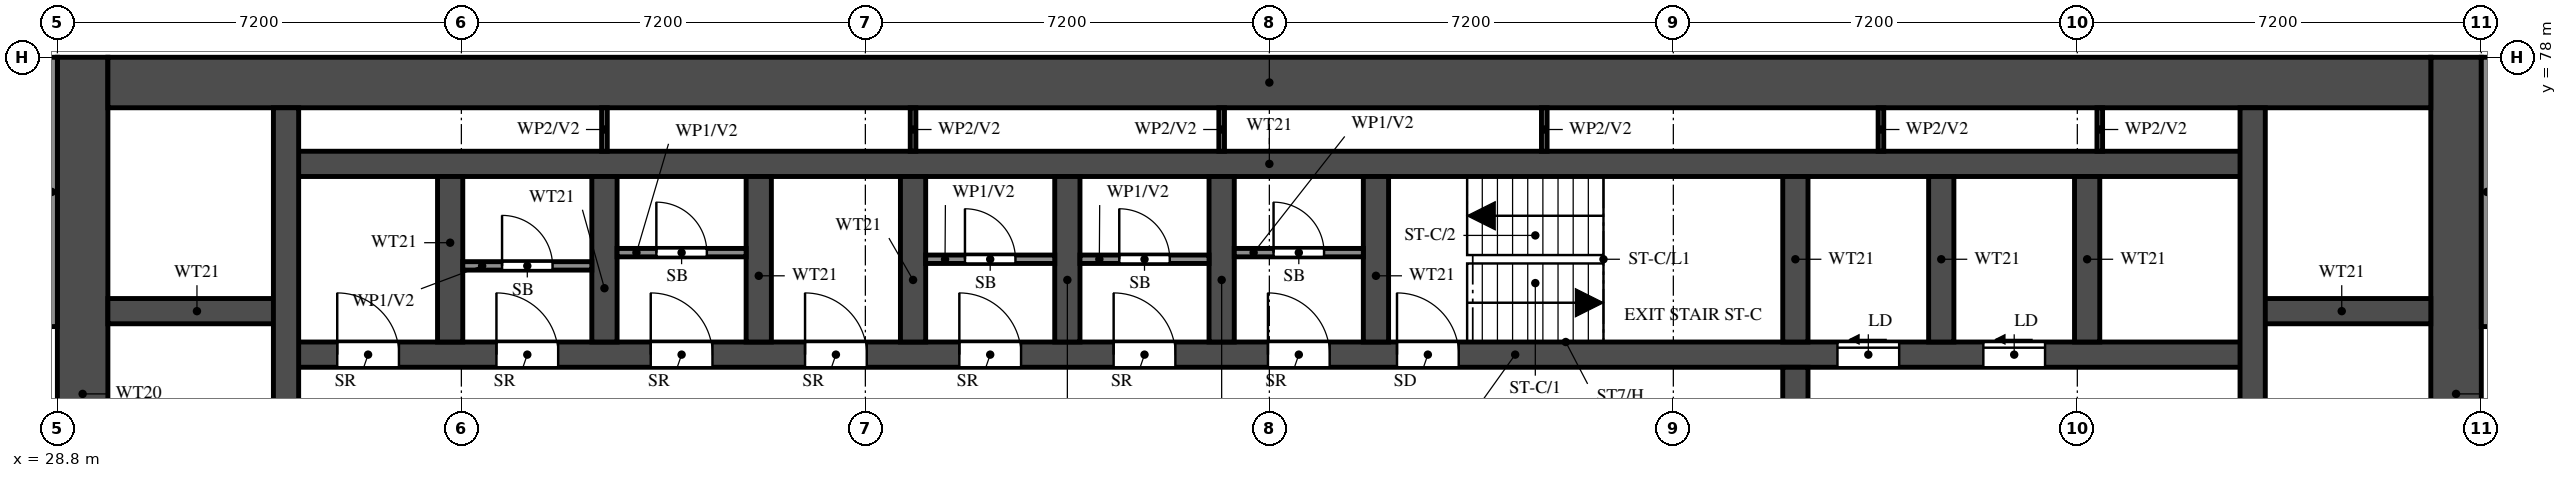
"""IFC4 building model, lengths in metres.
Left out: names, types, materials, properties, quantities, classifications, styles, units other than length and angle.
Written with IfcOpenShell. Run it as: python <this file> out.ifc"""

import sys

from ifc_helpers import new_model, si_unit, direction, frame, frame_2d, origin, place, context, subcontext, project, spatial, rectangle, extrude, element, fill, save


model = new_model("IFC4")
c1 = context("Model", 3, precision=1e-05, world=origin(), true_north=direction((0.0, 1.0)))
c2 = subcontext(c1, "Body", "Model", "MODEL_VIEW")
j1 = project(units=[si_unit("LENGTHUNIT", "METRE"), si_unit("PLANEANGLEUNIT", "RADIAN")], contexts=[c1])
p1 = place(None, origin())
s1 = spatial("IfcSite", under=j1, at=p1, CompositionType="ELEMENT")
p2 = place(p1, origin())
s2 = spatial("IfcBuilding", under=s1, at=p2, CompositionType="ELEMENT")
p3 = place(p2, frame((0.0, 0.0, 44.5)))
s3 = spatial("IfcBuildingStorey", under=s2, at=p3, CompositionType="ELEMENT", Elevation=44.5)
for number, where, z_axis, x_axis in (
    (1, (29.25, 66.0, 0.0), (0.0, 0.0, 1.0), (0.0, 1.0, 0.0)),
    (2, (71.55, 66.0, 0.0), (0.0, 0.0, 1.0), (0.0, 1.0, 0.0)),
):
    element("IfcWall", number, at=place(p3, frame(where, z_axis=z_axis, x_axis=x_axis)), inside=s3, PredefinedType="SHEAR", context=c2, shape_type="SweptSolid", body=[
        extrude(rectangle(XDim=12.0, YDim=0.9, at=frame_2d((6.0, 0.0))), origin(), (0.0, 0.0, 1.0), 3.18),
    ])
p4 = place(p3, frame((29.7, 77.55, 0.0), z_axis=(0.0, 0.0, 1.0), x_axis=(1.0, 0.0, 0.0)))
e3 = element("IfcWall", 3, at=p4, inside=s3, PredefinedType="SHEAR", context=c2, shape_type="SweptSolid", body=[
    extrude(rectangle(XDim=41.4, YDim=0.9, at=frame_2d((20.7, 0.0))), origin(), (0.0, 0.0, 1.0), 3.18),
])
p5 = place(p3, frame((32.875, 72.7, 0.0), z_axis=(0.0, 0.0, 1.0), x_axis=(1.0, 0.0, 0.0)))
e4 = element("IfcWall", 4, at=p5, inside=s3, PredefinedType="SHEAR", context=c2, shape_type="SweptSolid", body=[
    extrude(rectangle(XDim=35.05, YDim=0.45, at=frame_2d((17.525, 0.0))), origin(), (0.0, 0.0, 1.0), 3.18),
])
p6 = place(p5, frame((19.8, 0.0, 0.0)))
e5 = element("IfcOpeningElement", 5, at=p6, cuts=e4, PredefinedType="OPENING", context=c2, shape_type="SweptSolid", body=[
    extrude(rectangle(XDim=1.1, YDim=2.1, at=frame_2d((0.55, 1.05))), frame((0.0, 0.235, 0.0), z_axis=(0.0, -1.0, 0.0), x_axis=(1.0, 0.0, 0.0)), (0.0, 0.0, 1.0), 0.47),
])
p7 = place(p5, frame((27.65, 0.0, 0.0)))
e6 = element("IfcOpeningElement", 6, at=p7, cuts=e4, PredefinedType="OPENING", context=c2, shape_type="SweptSolid", body=[
    extrude(rectangle(XDim=1.1, YDim=2.1, at=frame_2d((0.55, 1.05))), frame((0.0, 0.235, 0.0), z_axis=(0.0, -1.0, 0.0), x_axis=(1.0, 0.0, 0.0)), (0.0, 0.0, 1.0), 0.47),
])
p8 = place(p5, frame((30.25, 0.0, 0.0)))
e7 = element("IfcOpeningElement", 7, at=p8, cuts=e4, PredefinedType="OPENING", context=c2, shape_type="SweptSolid", body=[
    extrude(rectangle(XDim=1.1, YDim=2.1, at=frame_2d((0.55, 1.05))), frame((0.0, 0.235, 0.0), z_axis=(0.0, -1.0, 0.0), x_axis=(1.0, 0.0, 0.0)), (0.0, 0.0, 1.0), 0.47),
])
p9 = place(p5, frame((3.75, 0.0, 0.0)))
e8 = element("IfcOpeningElement", 8, at=p9, cuts=e4, PredefinedType="OPENING", context=c2, shape_type="SweptSolid", body=[
    extrude(rectangle(XDim=1.1, YDim=2.1, at=frame_2d((0.55, 1.05))), frame((0.0, 0.235, 0.0), z_axis=(0.0, -1.0, 0.0), x_axis=(1.0, 0.0, 0.0)), (0.0, 0.0, 1.0), 0.47),
])
p10 = place(p5, frame((6.5, 0.0, 0.0)))
e9 = element("IfcOpeningElement", 9, at=p10, cuts=e4, PredefinedType="OPENING", context=c2, shape_type="SweptSolid", body=[
    extrude(rectangle(XDim=1.1, YDim=2.1, at=frame_2d((0.55, 1.05))), frame((0.0, 0.235, 0.0), z_axis=(0.0, -1.0, 0.0), x_axis=(1.0, 0.0, 0.0)), (0.0, 0.0, 1.0), 0.47),
])
p11 = place(p5, frame((9.25, 0.0, 0.0)))
e10 = element("IfcOpeningElement", 10, at=p11, cuts=e4, PredefinedType="OPENING", context=c2, shape_type="SweptSolid", body=[
    extrude(rectangle(XDim=1.1, YDim=2.1, at=frame_2d((0.55, 1.05))), frame((0.0, 0.235, 0.0), z_axis=(0.0, -1.0, 0.0), x_axis=(1.0, 0.0, 0.0)), (0.0, 0.0, 1.0), 0.47),
])
p12 = place(p5, frame((12.0, 0.0, 0.0)))
e11 = element("IfcOpeningElement", 11, at=p12, cuts=e4, PredefinedType="OPENING", context=c2, shape_type="SweptSolid", body=[
    extrude(rectangle(XDim=1.1, YDim=2.1, at=frame_2d((0.55, 1.05))), frame((0.0, 0.235, 0.0), z_axis=(0.0, -1.0, 0.0), x_axis=(1.0, 0.0, 0.0)), (0.0, 0.0, 1.0), 0.47),
])
p13 = place(p5, frame((14.75, 0.0, 0.0)))
e12 = element("IfcOpeningElement", 12, at=p13, cuts=e4, PredefinedType="OPENING", context=c2, shape_type="SweptSolid", body=[
    extrude(rectangle(XDim=1.1, YDim=2.1, at=frame_2d((0.55, 1.05))), frame((0.0, 0.235, 0.0), z_axis=(0.0, -1.0, 0.0), x_axis=(1.0, 0.0, 0.0)), (0.0, 0.0, 1.0), 0.47),
])
p14 = place(p5, frame((17.5, 0.0, 0.0)))
e13 = element("IfcOpeningElement", 13, at=p14, cuts=e4, PredefinedType="OPENING", context=c2, shape_type="SweptSolid", body=[
    extrude(rectangle(XDim=1.1, YDim=2.1, at=frame_2d((0.55, 1.05))), frame((0.0, 0.235, 0.0), z_axis=(0.0, -1.0, 0.0), x_axis=(1.0, 0.0, 0.0)), (0.0, 0.0, 1.0), 0.47),
])
p15 = place(p5, frame((0.913, 0.0, 0.0)))
e14 = element("IfcOpeningElement", 14, at=p15, cuts=e4, PredefinedType="OPENING", context=c2, shape_type="SweptSolid", body=[
    extrude(rectangle(XDim=1.1, YDim=2.1, at=frame_2d((0.55, 1.05))), frame((0.0, 0.235, 0.0), z_axis=(0.0, -1.0, 0.0), x_axis=(1.0, 0.0, 0.0)), (0.0, 0.0, 1.0), 0.47),
])
p16 = place(p3, frame((32.875, 76.1, 0.0), z_axis=(0.0, 0.0, 1.0), x_axis=(1.0, 0.0, 0.0)))
e15 = element("IfcWall", 15, at=p16, inside=s3, PredefinedType="SHEAR", context=c2, shape_type="SweptSolid", body=[
    extrude(rectangle(XDim=35.05, YDim=0.45, at=frame_2d((17.525, 0.0))), origin(), (0.0, 0.0, 1.0), 3.18),
])
for number, where, z_axis, x_axis in (
    (16, (29.7, 73.475, 0.0), (0.0, 0.0, 1.0), (1.0, 0.0, 0.0)),
    (17, (67.925, 73.475, 0.0), (0.0, 0.0, 1.0), (1.0, 0.0, 0.0)),
):
    element("IfcWall", number, at=place(p3, frame(where, z_axis=z_axis, x_axis=x_axis)), inside=s3, PredefinedType="SHEAR", context=c2, shape_type="SweptSolid", body=[
        extrude(rectangle(XDim=3.175, YDim=0.45, at=frame_2d((1.587, 0.0))), origin(), (0.0, 0.0, 1.0), 3.18),
    ])
p17 = place(p3, frame((32.875, 66.45, 0.0), z_axis=(0.0, 0.0, 1.0), x_axis=(0.0, 1.0, 0.0)))
e18 = element("IfcWall", 18, at=p17, inside=s3, PredefinedType="SHEAR", context=c2, shape_type="SweptSolid", body=[
    extrude(rectangle(XDim=10.65, YDim=0.45, at=frame_2d((5.325, 0.0))), origin(), (0.0, 0.0, 1.0), 3.18),
])
p18 = place(p3, frame((67.925, 66.45, 0.0), z_axis=(0.0, 0.0, 1.0), x_axis=(0.0, 1.0, 0.0)))
e19 = element("IfcWall", 19, at=p18, inside=s3, PredefinedType="SHEAR", context=c2, shape_type="SweptSolid", body=[
    extrude(rectangle(XDim=10.65, YDim=0.45, at=frame_2d((5.325, 0.0))), origin(), (0.0, 0.0, 1.0), 3.18),
])
p19 = place(p18, frame((0.15, 0.0, 0.0)))
e20 = element("IfcOpeningElement", 20, at=p19, cuts=e19, PredefinedType="OPENING", context=c2, shape_type="SweptSolid", body=[
    extrude(rectangle(XDim=1.1, YDim=2.1, at=frame_2d((0.55, 1.05))), frame((0.0, 0.235, 0.0), z_axis=(0.0, -1.0, 0.0), x_axis=(1.0, 0.0, 0.0)), (0.0, 0.0, 1.0), 0.47),
])
p20 = place(p3, frame((59.775, 66.45, 0.0), z_axis=(0.0, 0.0, 1.0), x_axis=(0.0, 1.0, 0.0)))
e21 = element("IfcWall", 21, at=p20, inside=s3, PredefinedType="SHEAR", context=c2, shape_type="SweptSolid", body=[
    extrude(rectangle(XDim=6.025, YDim=0.45, at=frame_2d((3.013, 0.0))), origin(), (0.0, 0.0, 1.0), 3.18),
])
p21 = place(p20, frame((3.85, 0.0, 0.0)))
e22 = element("IfcOpeningElement", 22, at=p21, cuts=e21, PredefinedType="OPENING", context=c2, shape_type="SweptSolid", body=[
    extrude(rectangle(XDim=1.2, YDim=2.1, at=frame_2d((0.6, 1.05))), frame((0.0, 0.235, 0.0), z_axis=(0.0, -1.0, 0.0), x_axis=(1.0, 0.0, 0.0)), (0.0, 0.0, 1.0), 0.47),
])
for number, where, z_axis, x_axis in (
    (23, (59.775, 72.925, 0.0), (0.0, 0.0, 1.0), (0.0, 1.0, 0.0)),
    (24, (35.8, 72.925, 0.0), (0.0, 0.0, 1.0), (0.0, 1.0, 0.0)),
    (25, (38.55, 72.925, 0.0), (0.0, 0.0, 1.0), (0.0, 1.0, 0.0)),
    (26, (41.3, 72.925, 0.0), (0.0, 0.0, 1.0), (0.0, 1.0, 0.0)),
    (27, (44.05, 72.925, 0.0), (0.0, 0.0, 1.0), (0.0, 1.0, 0.0)),
    (28, (46.8, 72.925, 0.0), (0.0, 0.0, 1.0), (0.0, 1.0, 0.0)),
    (29, (49.55, 72.925, 0.0), (0.0, 0.0, 1.0), (0.0, 1.0, 0.0)),
    (30, (52.3, 72.925, 0.0), (0.0, 0.0, 1.0), (0.0, 1.0, 0.0)),
    (31, (62.375, 72.925, 0.0), (0.0, 0.0, 1.0), (0.0, 1.0, 0.0)),
    (32, (64.975, 72.925, 0.0), (0.0, 0.0, 1.0), (0.0, 1.0, 0.0)),
):
    element("IfcWall", number, at=place(p3, frame(where, z_axis=z_axis, x_axis=x_axis)), inside=s3, PredefinedType="SHEAR", context=c2, shape_type="SweptSolid", body=[
        extrude(rectangle(XDim=2.95, YDim=0.45, at=frame_2d((1.475, 0.0))), origin(), (0.0, 0.0, 1.0), 3.18),
    ])
p22 = place(p3, frame((36.025, 74.282, 0.0), z_axis=(0.0, 0.0, 1.0), x_axis=(1.0, 0.0, 0.0)))
e33 = element("IfcWall", 33, at=p22, inside=s3, PredefinedType="PARTITIONING", context=c2, shape_type="SweptSolid", body=[
    extrude(rectangle(XDim=2.3, YDim=0.15, at=frame_2d((1.15, 0.0))), origin(), (0.0, 0.0, 1.0), 3.18),
])
p23 = place(p22, frame((0.7, 0.0, 0.0)))
e34 = element("IfcOpeningElement", 34, at=p23, cuts=e33, PredefinedType="OPENING", context=c2, shape_type="SweptSolid", body=[
    extrude(rectangle(XDim=0.9, YDim=2.1, at=frame_2d((0.45, 1.05))), frame((0.0, 0.085, 0.0), z_axis=(0.0, -1.0, 0.0), x_axis=(1.0, 0.0, 0.0)), (0.0, 0.0, 1.0), 0.17),
])
p24 = place(p3, frame((38.775, 74.518, 0.0), z_axis=(0.0, 0.0, 1.0), x_axis=(1.0, 0.0, 0.0)))
e35 = element("IfcWall", 35, at=p24, inside=s3, PredefinedType="PARTITIONING", context=c2, shape_type="SweptSolid", body=[
    extrude(rectangle(XDim=2.3, YDim=0.15, at=frame_2d((1.15, 0.0))), origin(), (0.0, 0.0, 1.0), 3.18),
])
p25 = place(p24, frame((0.7, 0.0, 0.0)))
e36 = element("IfcOpeningElement", 36, at=p25, cuts=e35, PredefinedType="OPENING", context=c2, shape_type="SweptSolid", body=[
    extrude(rectangle(XDim=0.9, YDim=2.1, at=frame_2d((0.45, 1.05))), frame((0.0, 0.085, 0.0), z_axis=(0.0, -1.0, 0.0), x_axis=(1.0, 0.0, 0.0)), (0.0, 0.0, 1.0), 0.17),
])
p26 = place(p3, frame((44.275, 74.4, 0.0), z_axis=(0.0, 0.0, 1.0), x_axis=(1.0, 0.0, 0.0)))
e37 = element("IfcWall", 37, at=p26, inside=s3, PredefinedType="PARTITIONING", context=c2, shape_type="SweptSolid", body=[
    extrude(rectangle(XDim=2.3, YDim=0.15, at=frame_2d((1.15, 0.0))), origin(), (0.0, 0.0, 1.0), 3.18),
])
p27 = place(p26, frame((0.7, 0.0, 0.0)))
e38 = element("IfcOpeningElement", 38, at=p27, cuts=e37, PredefinedType="OPENING", context=c2, shape_type="SweptSolid", body=[
    extrude(rectangle(XDim=0.9, YDim=2.1, at=frame_2d((0.45, 1.05))), frame((0.0, 0.085, 0.0), z_axis=(0.0, -1.0, 0.0), x_axis=(1.0, 0.0, 0.0)), (0.0, 0.0, 1.0), 0.17),
])
p28 = place(p3, frame((47.025, 74.4, 0.0), z_axis=(0.0, 0.0, 1.0), x_axis=(1.0, 0.0, 0.0)))
e39 = element("IfcWall", 39, at=p28, inside=s3, PredefinedType="PARTITIONING", context=c2, shape_type="SweptSolid", body=[
    extrude(rectangle(XDim=2.3, YDim=0.15, at=frame_2d((1.15, 0.0))), origin(), (0.0, 0.0, 1.0), 3.18),
])
p29 = place(p28, frame((0.7, 0.0, 0.0)))
e40 = element("IfcOpeningElement", 40, at=p29, cuts=e39, PredefinedType="OPENING", context=c2, shape_type="SweptSolid", body=[
    extrude(rectangle(XDim=0.9, YDim=2.1, at=frame_2d((0.45, 1.05))), frame((0.0, 0.085, 0.0), z_axis=(0.0, -1.0, 0.0), x_axis=(1.0, 0.0, 0.0)), (0.0, 0.0, 1.0), 0.17),
])
p30 = place(p3, frame((49.775, 74.518, 0.0), z_axis=(0.0, 0.0, 1.0), x_axis=(1.0, 0.0, 0.0)))
e41 = element("IfcWall", 41, at=p30, inside=s3, PredefinedType="PARTITIONING", context=c2, shape_type="SweptSolid", body=[
    extrude(rectangle(XDim=2.3, YDim=0.15, at=frame_2d((1.15, 0.0))), origin(), (0.0, 0.0, 1.0), 3.18),
])
p31 = place(p30, frame((0.7, 0.0, 0.0)))
e42 = element("IfcOpeningElement", 42, at=p31, cuts=e41, PredefinedType="OPENING", context=c2, shape_type="SweptSolid", body=[
    extrude(rectangle(XDim=0.9, YDim=2.1, at=frame_2d((0.45, 1.05))), frame((0.0, 0.085, 0.0), z_axis=(0.0, -1.0, 0.0), x_axis=(1.0, 0.0, 0.0)), (0.0, 0.0, 1.0), 0.17),
])
for number, where, z_axis, x_axis in (
    (43, (38.55, 76.325, 0.0), (0.0, 0.0, 1.0), (0.0, 1.0, 0.0)),
    (44, (44.05, 76.325, 0.0), (0.0, 0.0, 1.0), (0.0, 1.0, 0.0)),
    (45, (49.55, 76.325, 0.0), (0.0, 0.0, 1.0), (0.0, 1.0, 0.0)),
    (46, (55.3, 76.325, 0.0), (0.0, 0.0, 1.0), (0.0, 1.0, 0.0)),
    (47, (61.3, 76.325, 0.0), (0.0, 0.0, 1.0), (0.0, 1.0, 0.0)),
    (48, (65.2, 76.325, 0.0), (0.0, 0.0, 1.0), (0.0, 1.0, 0.0)),
):
    element("IfcWall", number, at=place(p3, frame(where, z_axis=z_axis, x_axis=x_axis)), inside=s3, PredefinedType="PARTITIONING", context=c2, shape_type="SweptSolid", body=[
        extrude(rectangle(XDim=0.775, YDim=0.1, at=frame_2d((0.388, 0.0))), origin(), (0.0, 0.0, 1.0), 3.18),
    ])
for number, where, z_axis, x_axis in (
    (49, (28.7, 73.2, 0.0), (0.0, 0.0, 1.0), (0.0, 1.0, 0.0)),
    (50, (72.1, 73.2, 0.0), (0.0, 0.0, 1.0), (0.0, 1.0, 0.0)),
):
    element("IfcWall", number, at=place(p3, frame(where, z_axis=z_axis, x_axis=x_axis)), inside=s3, PredefinedType="SOLIDWALL", context=c2, shape_type="SweptSolid", body=[
        extrude(rectangle(XDim=4.8, YDim=0.2, at=frame_2d((2.4, 0.0))), origin(), (0.0, 0.0, 1.0), 3.18),
    ])
p32 = place(p6, origin())
e51 = element("IfcDoor", 51, at=p32, inside=s3, OperationType="SINGLE_SWING_LEFT", PredefinedType="DOOR", context=c2, shape_type="SweptSolid", body=[
    extrude(rectangle(XDim=1.1, YDim=2.1, at=frame_2d((0.55, 1.05))), frame((0.0, 0.025, 0.0), z_axis=(0.0, -1.0, 0.0), x_axis=(1.0, 0.0, 0.0)), (0.0, 0.0, 1.0), 0.05),
])
fill(e5, e51)
p33 = place(p7, origin())
e52 = element("IfcDoor", 52, at=p33, inside=s3, OperationType="SLIDING_TO_LEFT", PredefinedType="DOOR", context=c2, shape_type="SweptSolid", body=[
    extrude(rectangle(XDim=1.1, YDim=2.1, at=frame_2d((0.55, 1.05))), frame((0.0, 0.025, 0.0), z_axis=(0.0, -1.0, 0.0), x_axis=(1.0, 0.0, 0.0)), (0.0, 0.0, 1.0), 0.05),
])
fill(e6, e52)
p34 = place(p8, origin())
e53 = element("IfcDoor", 53, at=p34, inside=s3, OperationType="SLIDING_TO_LEFT", PredefinedType="DOOR", context=c2, shape_type="SweptSolid", body=[
    extrude(rectangle(XDim=1.1, YDim=2.1, at=frame_2d((0.55, 1.05))), frame((0.0, 0.025, 0.0), z_axis=(0.0, -1.0, 0.0), x_axis=(1.0, 0.0, 0.0)), (0.0, 0.0, 1.0), 0.05),
])
fill(e7, e53)
p35 = place(p9, origin())
e54 = element("IfcDoor", 54, at=p35, inside=s3, OperationType="SINGLE_SWING_LEFT", PredefinedType="DOOR", context=c2, shape_type="SweptSolid", body=[
    extrude(rectangle(XDim=1.1, YDim=2.1, at=frame_2d((0.55, 1.05))), frame((0.0, 0.025, 0.0), z_axis=(0.0, -1.0, 0.0), x_axis=(1.0, 0.0, 0.0)), (0.0, 0.0, 1.0), 0.05),
])
fill(e8, e54)
p36 = place(p23, origin())
e55 = element("IfcDoor", 55, at=p36, inside=s3, OperationType="SINGLE_SWING_LEFT", PredefinedType="DOOR", context=c2, shape_type="SweptSolid", body=[
    extrude(rectangle(XDim=0.9, YDim=2.1, at=frame_2d((0.45, 1.05))), frame((0.0, 0.025, 0.0), z_axis=(0.0, -1.0, 0.0), x_axis=(1.0, 0.0, 0.0)), (0.0, 0.0, 1.0), 0.05),
])
fill(e34, e55)
p37 = place(p10, origin())
e56 = element("IfcDoor", 56, at=p37, inside=s3, OperationType="SINGLE_SWING_LEFT", PredefinedType="DOOR", context=c2, shape_type="SweptSolid", body=[
    extrude(rectangle(XDim=1.1, YDim=2.1, at=frame_2d((0.55, 1.05))), frame((0.0, 0.025, 0.0), z_axis=(0.0, -1.0, 0.0), x_axis=(1.0, 0.0, 0.0)), (0.0, 0.0, 1.0), 0.05),
])
fill(e9, e56)
p38 = place(p25, origin())
e57 = element("IfcDoor", 57, at=p38, inside=s3, OperationType="SINGLE_SWING_LEFT", PredefinedType="DOOR", context=c2, shape_type="SweptSolid", body=[
    extrude(rectangle(XDim=0.9, YDim=2.1, at=frame_2d((0.45, 1.05))), frame((0.0, 0.025, 0.0), z_axis=(0.0, -1.0, 0.0), x_axis=(1.0, 0.0, 0.0)), (0.0, 0.0, 1.0), 0.05),
])
fill(e36, e57)
p39 = place(p11, origin())
e58 = element("IfcDoor", 58, at=p39, inside=s3, OperationType="SINGLE_SWING_LEFT", PredefinedType="DOOR", context=c2, shape_type="SweptSolid", body=[
    extrude(rectangle(XDim=1.1, YDim=2.1, at=frame_2d((0.55, 1.05))), frame((0.0, 0.025, 0.0), z_axis=(0.0, -1.0, 0.0), x_axis=(1.0, 0.0, 0.0)), (0.0, 0.0, 1.0), 0.05),
])
fill(e10, e58)
p40 = place(p12, origin())
e59 = element("IfcDoor", 59, at=p40, inside=s3, OperationType="SINGLE_SWING_LEFT", PredefinedType="DOOR", context=c2, shape_type="SweptSolid", body=[
    extrude(rectangle(XDim=1.1, YDim=2.1, at=frame_2d((0.55, 1.05))), frame((0.0, 0.025, 0.0), z_axis=(0.0, -1.0, 0.0), x_axis=(1.0, 0.0, 0.0)), (0.0, 0.0, 1.0), 0.05),
])
fill(e11, e59)
p41 = place(p27, origin())
e60 = element("IfcDoor", 60, at=p41, inside=s3, OperationType="SINGLE_SWING_RIGHT", PredefinedType="DOOR", context=c2, shape_type="SweptSolid", body=[
    extrude(rectangle(XDim=0.9, YDim=2.1, at=frame_2d((0.45, 1.05))), frame((0.0, 0.025, 0.0), z_axis=(0.0, -1.0, 0.0), x_axis=(1.0, 0.0, 0.0)), (0.0, 0.0, 1.0), 0.05),
])
fill(e38, e60)
p42 = place(p13, origin())
e61 = element("IfcDoor", 61, at=p42, inside=s3, OperationType="SINGLE_SWING_LEFT", PredefinedType="DOOR", context=c2, shape_type="SweptSolid", body=[
    extrude(rectangle(XDim=1.1, YDim=2.1, at=frame_2d((0.55, 1.05))), frame((0.0, 0.025, 0.0), z_axis=(0.0, -1.0, 0.0), x_axis=(1.0, 0.0, 0.0)), (0.0, 0.0, 1.0), 0.05),
])
fill(e12, e61)
p43 = place(p29, origin())
e62 = element("IfcDoor", 62, at=p43, inside=s3, OperationType="SINGLE_SWING_LEFT", PredefinedType="DOOR", context=c2, shape_type="SweptSolid", body=[
    extrude(rectangle(XDim=0.9, YDim=2.1, at=frame_2d((0.45, 1.05))), frame((0.0, 0.025, 0.0), z_axis=(0.0, -1.0, 0.0), x_axis=(1.0, 0.0, 0.0)), (0.0, 0.0, 1.0), 0.05),
])
fill(e40, e62)
p44 = place(p14, origin())
e63 = element("IfcDoor", 63, at=p44, inside=s3, OperationType="SINGLE_SWING_LEFT", PredefinedType="DOOR", context=c2, shape_type="SweptSolid", body=[
    extrude(rectangle(XDim=1.1, YDim=2.1, at=frame_2d((0.55, 1.05))), frame((0.0, 0.025, 0.0), z_axis=(0.0, -1.0, 0.0), x_axis=(1.0, 0.0, 0.0)), (0.0, 0.0, 1.0), 0.05),
])
fill(e13, e63)
p45 = place(p31, origin())
e64 = element("IfcDoor", 64, at=p45, inside=s3, OperationType="SINGLE_SWING_LEFT", PredefinedType="DOOR", context=c2, shape_type="SweptSolid", body=[
    extrude(rectangle(XDim=0.9, YDim=2.1, at=frame_2d((0.45, 1.05))), frame((0.0, 0.025, 0.0), z_axis=(0.0, -1.0, 0.0), x_axis=(1.0, 0.0, 0.0)), (0.0, 0.0, 1.0), 0.05),
])
fill(e42, e64)
p46 = place(p15, origin())
e65 = element("IfcDoor", 65, at=p46, inside=s3, OperationType="SINGLE_SWING_LEFT", PredefinedType="DOOR", context=c2, shape_type="SweptSolid", body=[
    extrude(rectangle(XDim=1.1, YDim=2.1, at=frame_2d((0.55, 1.05))), frame((0.0, 0.025, 0.0), z_axis=(0.0, -1.0, 0.0), x_axis=(1.0, 0.0, 0.0)), (0.0, 0.0, 1.0), 0.05),
])
fill(e14, e65)
save(model, sys.argv[1])
